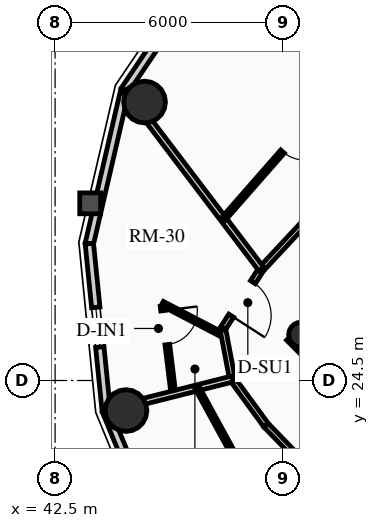
"""IFC4 building model, lengths in metres.
Left out: names, types, materials, properties, quantities, classifications, styles, units other than length and angle.
Written with IfcOpenShell. Run it as: python <this file> out.ifc"""

import sys

from ifc_helpers import new_model, si_unit, direction, frame, frame_2d, origin, origin_2d, place, context, subcontext, project, spatial, rectangle, circle, hollow_circle, extrude, source, transform, mapped, element, fill, save


model = new_model("IFC4")
c1 = context("Model", 3, precision=1e-05, world=origin(), true_north=direction((0.0, 1.0)))
c2 = subcontext(c1, "Body", "Model", "MODEL_VIEW")
j1 = project(units=[si_unit("LENGTHUNIT", "METRE"), si_unit("PLANEANGLEUNIT", "RADIAN")], contexts=[c1])
p1 = place(None, origin())
s1 = spatial("IfcSite", under=j1, at=p1, CompositionType="ELEMENT")
p2 = place(p1, origin())
s2 = spatial("IfcBuilding", under=s1, at=p2, CompositionType="ELEMENT")
p3 = place(p2, frame((0.0, 0.0, 217.03)))
s3 = spatial("IfcBuildingStorey", under=s2, at=p3, CompositionType="ELEMENT", Elevation=217.03)
p4 = place(p3, frame((58.702, 15.732, 0.0), z_axis=(0.0, 0.0, 1.0), x_axis=(-0.707106781187, 0.707106781187, 0.0)))
e1 = element("IfcWall", 1, at=p4, inside=s3, PredefinedType="SHEAR", context=c2, shape_type="SweptSolid", body=[
    extrude(rectangle(XDim=14.1, YDim=0.4, at=frame_2d((7.05, 0.0))), origin(), (0.0, 0.0, 1.0), 2.91),
])
p5 = place(p3, frame((48.873, 25.561, 0.0), z_axis=(0.0, 0.0, 1.0), x_axis=(0.707106781187, 0.707106781187, 0.0)))
e2 = element("IfcWall", 2, at=p5, inside=s3, PredefinedType="SHEAR", context=c2, shape_type="SweptSolid", body=[
    extrude(rectangle(XDim=10.7, YDim=0.4, at=frame_2d((5.35, 0.0))), origin(), (0.0, 0.0, 1.0), 2.91),
])
m1 = source(origin(), c2, "Body", "SweptSolid", [
    extrude(rectangle(XDim=1.5, YDim=2.02, at=frame_2d((0.75, 1.01))), frame((0.0, 0.21, 0.0), z_axis=(0.0, -1.0, 0.0), x_axis=(1.0, 0.0, 0.0)), (0.0, 0.0, 1.0), 0.42),
])
p6 = place(p5, frame((4.6, 0.0, 0.0)))
e3 = element("IfcOpeningElement", 3, at=p6, cuts=e2, PredefinedType="OPENING", context=c2, shape_type="MappedRepresentation", body=[
    mapped(m1, transform((0.0, 0.0, 0.0), x_axis=(1.0, 0.0, 0.0), y_axis=(0.0, 1.0, 0.0), z_axis=(0.0, 0.0, 1.0), scale=1.0)),
])
p7 = place(p3, frame((48.976, 25.706, 0.0), z_axis=(0.0, 0.0, 1.0), x_axis=(0.707106781187, 0.707106781187, 0.0)))
e4 = element("IfcColumn", 4, at=p7, inside=s3, PredefinedType="COLUMN", context=c2, shape_type="SweptSolid", body=[
    extrude(hollow_circle(Radius=0.33, WallThickness=0.025, at=origin_2d()), origin(), (0.0, 0.0, 1.0), 2.91),
])
for number, where, z_axis, x_axis in (
    (5, (44.854, 31.827, 0.0), (0.0, 0.0, 1.0), (1.0, 0.0, 0.0)),
    (6, (44.365, 23.709, 0.0), (0.0, 0.0, 1.0), (1.0, 0.0, 0.0)),
):
    element("IfcColumn", number, at=place(p3, frame(where, z_axis=z_axis, x_axis=x_axis)), inside=s3, PredefinedType="USERDEFINED", context=c2, shape_type="SweptSolid", body=[
        extrude(circle(Radius=0.55, at=origin_2d()), origin(), (0.0, 0.0, 1.0), 2.91),
    ])
p8 = place(p3, frame((44.337, 32.144, 0.0), z_axis=(0.0, 0.0, 1.0), x_axis=(0.559495003079, 0.828833723692, 0.0)))
e7 = element("IfcWall", 7, at=p8, inside=s3, PredefinedType="SOLIDWALL", context=c2, shape_type="SweptSolid", body=[
    extrude(rectangle(XDim=3.976, YDim=0.22, at=frame_2d((1.988, 0.0))), origin(), (0.0, 0.0, 1.0), 2.322),
])
m2 = source(origin(), c2, "Body", "SweptSolid", [
    extrude(rectangle(XDim=1.05, YDim=1.3, at=frame_2d((0.525, 0.65))), frame((0.0, 0.12, 0.0), z_axis=(0.0, -1.0, 0.0), x_axis=(1.0, 0.0, 0.0)), (0.0, 0.0, 1.0), 0.24),
])
p9 = place(p8, frame((1.463, 0.0, 0.65)))
e8 = element("IfcOpeningElement", 8, at=p9, cuts=e7, PredefinedType="OPENING", context=c2, shape_type="MappedRepresentation", body=[
    mapped(m2, transform((0.0, 0.0, 0.0), x_axis=(1.0, 0.0, 0.0), y_axis=(0.0, 1.0, 0.0), z_axis=(0.0, 0.0, 1.0), scale=1.0)),
])
p10 = place(p3, frame((43.401, 28.1, 0.0), z_axis=(0.0, 0.0, 1.0), x_axis=(0.225473813158, 0.974249228678, 0.0)))
e9 = element("IfcWall", 9, at=p10, inside=s3, PredefinedType="SOLIDWALL", context=c2, shape_type="SweptSolid", body=[
    extrude(rectangle(XDim=4.15, YDim=0.22, at=frame_2d((2.075, 0.0))), origin(), (0.0, 0.0, 1.0), 2.322),
])
p11 = place(p3, frame((43.845, 23.705, 0.0), z_axis=(0.0, 0.0, 1.0), x_axis=(-0.100570534541, 0.994929930991, 0.0)))
e10 = element("IfcWall", 10, at=p11, inside=s3, PredefinedType="SOLIDWALL", context=c2, shape_type="SweptSolid", body=[
    extrude(rectangle(XDim=4.418, YDim=0.22, at=frame_2d((2.209, 0.0))), origin(), (0.0, 0.0, 1.0), 2.322),
])
p12 = place(p11, frame((1.684, 0.0, 0.65)))
e11 = element("IfcOpeningElement", 11, at=p12, cuts=e10, PredefinedType="OPENING", context=c2, shape_type="MappedRepresentation", body=[
    mapped(m2, transform((0.0, 0.0, 0.0), x_axis=(1.0, 0.0, 0.0), y_axis=(0.0, 1.0, 0.0), z_axis=(0.0, 0.0, 1.0), scale=1.0)),
])
p13 = place(p3, frame((45.626, 19.387, 0.0), z_axis=(0.0, 0.0, 1.0), x_axis=(-0.381309704956, 0.924447353237, 0.0)))
e12 = element("IfcWall", 12, at=p13, inside=s3, PredefinedType="SOLIDWALL", context=c2, shape_type="SweptSolid", body=[
    extrude(rectangle(XDim=4.671, YDim=0.22, at=frame_2d((2.335, 0.0))), origin(), (0.0, 0.0, 1.0), 2.322),
])
p14 = place(p13, frame((1.81, 0.0, 0.65)))
e13 = element("IfcOpeningElement", 13, at=p14, cuts=e12, PredefinedType="OPENING", context=c2, shape_type="MappedRepresentation", body=[
    mapped(m2, transform((0.0, 0.0, 0.0), x_axis=(1.0, 0.0, 0.0), y_axis=(0.0, 1.0, 0.0), z_axis=(0.0, 0.0, 1.0), scale=1.0)),
])
p15 = place(p3, frame((52.212, 32.024, 0.0), z_axis=(0.0, 0.0, 1.0), x_axis=(-0.682158998173, -0.731203871169, 0.0)))
e14 = element("IfcWall", 14, at=p15, inside=s3, PredefinedType="PARTITIONING", context=c2, shape_type="SweptSolid", body=[
    extrude(rectangle(XDim=6.282, YDim=0.15, at=frame_2d((3.141, 0.0))), origin(), (0.0, 0.0, 1.0), 2.255),
])
p16 = place(p3, frame((47.927, 27.431, 0.0), z_axis=(0.0, 0.0, 1.0), x_axis=(-0.543126643356, -0.839650790077, 0.0)))
e15 = element("IfcWall", 15, at=p16, inside=s3, PredefinedType="PARTITIONING", context=c2, shape_type="SweptSolid", body=[
    extrude(rectangle(XDim=1.868, YDim=0.15, at=frame_2d((0.934, 0.0))), origin(), (0.0, 0.0, 1.0), 2.255),
])
m3 = source(origin(), c2, "Body", "SweptSolid", [
    extrude(rectangle(XDim=1.05, YDim=2.015, at=frame_2d((0.525, 1.007))), frame((0.0, 0.085, 0.0), z_axis=(0.0, -1.0, 0.0), x_axis=(1.0, 0.0, 0.0)), (0.0, 0.0, 1.0), 0.17),
])
p17 = place(p16, frame((0.409, 0.0, 0.0)))
e16 = element("IfcOpeningElement", 16, at=p17, cuts=e15, PredefinedType="OPENING", context=c2, shape_type="MappedRepresentation", body=[
    mapped(m3, transform((0.0, 0.0, 0.0), x_axis=(1.0, 0.0, 0.0), y_axis=(0.0, 1.0, 0.0), z_axis=(0.0, 0.0, 1.0), scale=1.0)),
])
p18 = place(p3, frame((46.912, 25.862, 0.0), z_axis=(0.0, 0.0, 1.0), x_axis=(0.186095172215, -0.98253172309, 0.0)))
e17 = element("IfcWall", 17, at=p18, inside=s3, PredefinedType="PARTITIONING", context=c2, shape_type="SweptSolid", body=[
    extrude(rectangle(XDim=1.346, YDim=0.15, at=frame_2d((0.673, 0.0))), origin(), (0.0, 0.0, 1.0), 2.322),
])
p19 = place(p3, frame((47.163, 24.54, 0.0), z_axis=(0.0, 0.0, 1.0), x_axis=(0.589711902124, -0.807613690135, 0.0)))
e18 = element("IfcWall", 18, at=p19, inside=s3, PredefinedType="PARTITIONING", context=c2, shape_type="SweptSolid", body=[
    extrude(rectangle(XDim=1.507, YDim=0.15, at=frame_2d((0.753, 0.0))), origin(), (0.0, 0.0, 1.0), 2.255),
])
p20 = place(p3, frame((48.052, 23.323, 0.0), z_axis=(0.0, 0.0, 1.0), x_axis=(0.696573981306, -0.717484974454, 0.0)))
e19 = element("IfcWall", 19, at=p20, inside=s3, PredefinedType="PARTITIONING", context=c2, shape_type="SweptSolid", body=[
    extrude(rectangle(XDim=5.849, YDim=0.15, at=frame_2d((2.925, 0.0))), origin(), (0.0, 0.0, 1.0), 2.685),
])
p21 = place(p3, frame((47.927, 27.431, 0.0), z_axis=(0.0, 0.0, 1.0), x_axis=(-0.604823333103, 0.796359677366, 0.0)))
e20 = element("IfcWall", 20, at=p21, inside=s3, PredefinedType="PARTITIONING", context=c2, shape_type="SweptSolid", body=[
    extrude(rectangle(XDim=5.907, YDim=0.16, at=frame_2d((2.953, 0.0))), origin(), (0.0, 0.0, 1.0), 2.322),
])
p22 = place(p3, frame((47.163, 24.54, 0.0), z_axis=(0.0, 0.0, 1.0), x_axis=(-0.9696166611, -0.244629373781, 0.0)))
e21 = element("IfcWall", 21, at=p22, inside=s3, PredefinedType="PARTITIONING", context=c2, shape_type="SweptSolid", body=[
    extrude(rectangle(XDim=3.401, YDim=0.16, at=frame_2d((1.701, 0.0))), origin(), (0.0, 0.0, 1.0), 2.322),
])
p23 = place(p3, frame((50.634, 32.977, 0.0), z_axis=(0.0, 0.0, 1.0), x_axis=(-0.659241945747, -0.751930885765, 0.0)))
e22 = element("IfcWall", 22, at=p23, inside=s3, PredefinedType="PARTITIONING", context=c2, shape_type="SweptSolid", body=[
    extrude(rectangle(XDim=5.624, YDim=0.125, at=frame_2d((2.812, 0.0))), origin(), (0.0, 0.0, 1.0), 2.255),
])
m4 = source(origin(), c2, "Body", "SweptSolid", [
    extrude(rectangle(XDim=0.9, YDim=2.005, at=frame_2d((0.45, 1.002))), frame((0.0, 0.073, 0.0), z_axis=(0.0, -1.0, 0.0), x_axis=(1.0, 0.0, 0.0)), (0.0, 0.0, 1.0), 0.145),
])
p24 = place(p23, frame((2.362, 0.0, 0.0)))
e23 = element("IfcOpeningElement", 23, at=p24, cuts=e22, PredefinedType="OPENING", context=c2, shape_type="MappedRepresentation", body=[
    mapped(m4, transform((0.0, 0.0, 0.0), x_axis=(1.0, 0.0, 0.0), y_axis=(0.0, 1.0, 0.0), z_axis=(0.0, 0.0, 1.0), scale=1.0)),
])
p25 = place(p3, frame((46.844, 25.731, 0.0), z_axis=(0.0, 0.0, 1.0), x_axis=(-0.886802533251, 0.462148533504, 0.0)))
e24 = element("IfcWall", 24, at=p25, inside=s3, PredefinedType="PARTITIONING", context=c2, shape_type="SweptSolid", body=[
    extrude(rectangle(XDim=1.719, YDim=0.125, at=frame_2d((0.859, 0.0))), origin(), (0.0, 0.0, 1.0), 2.685),
])
p26 = place(p3, frame((45.328, 26.457, 0.0), z_axis=(0.0, 0.0, 1.0), x_axis=(0.122605181354, -0.992455525203, 0.0)))
e25 = element("IfcWall", 25, at=p26, inside=s3, PredefinedType="PARTITIONING", context=c2, shape_type="SweptSolid", body=[
    extrude(rectangle(XDim=2.228, YDim=0.125, at=frame_2d((1.114, 0.0))), origin(), (0.0, 0.0, 1.0), 2.322),
])
p27 = place(p26, frame((0.12, 0.0, 0.0)))
e26 = element("IfcOpeningElement", 26, at=p27, cuts=e25, PredefinedType="OPENING", context=c2, shape_type="MappedRepresentation", body=[
    mapped(m4, transform((0.0, 0.0, 0.0), x_axis=(1.0, 0.0, 0.0), y_axis=(0.0, 1.0, 0.0), z_axis=(0.0, 0.0, 1.0), scale=1.0)),
])
p28 = place(p3, frame((46.24, 24.307, 0.0), z_axis=(0.0, 0.0, 1.0), x_axis=(0.479212341296, -0.87769899849, 0.0)))
e27 = element("IfcWall", 27, at=p28, inside=s3, PredefinedType="PARTITIONING", context=c2, shape_type="SweptSolid", body=[
    extrude(rectangle(XDim=2.374, YDim=0.125, at=frame_2d((1.187, 0.0))), origin(), (0.0, 0.0, 1.0), 2.255),
])
m5 = source(origin(), c2, "Body", "SweptSolid", [
    extrude(rectangle(XDim=1.05, YDim=1.3, at=frame_2d((0.525, 0.65))), frame((0.0, 0.03, 0.0), z_axis=(0.0, -1.0, 0.0), x_axis=(1.0, 0.0, 0.0)), (0.0, 0.0, 1.0), 0.06),
])
p29 = place(p12, origin())
e28 = element("IfcWindow", 28, at=p29, inside=s3, PartitioningType="SINGLE_PANEL", PredefinedType="WINDOW", context=c2, shape_type="MappedRepresentation", body=[
    mapped(m5, transform((0.0, 0.0, 0.0), x_axis=(1.0, 0.0, 0.0), y_axis=(0.0, 1.0, 0.0), z_axis=(0.0, 0.0, 1.0), scale=1.0)),
])
fill(e11, e28)
m6 = source(origin(), c2, "Body", "SweptSolid", [
    extrude(rectangle(XDim=0.9, YDim=2.005, at=frame_2d((0.45, 1.002))), frame((0.0, 0.025, 0.0), z_axis=(0.0, -1.0, 0.0), x_axis=(1.0, 0.0, 0.0)), (0.0, 0.0, 1.0), 0.05),
])
p30 = place(p24, origin())
e29 = element("IfcDoor", 29, at=p30, inside=s3, OperationType="SINGLE_SWING_LEFT", PredefinedType="DOOR", context=c2, shape_type="MappedRepresentation", body=[
    mapped(m6, transform((0.0, 0.0, 0.0), x_axis=(1.0, 0.0, 0.0), y_axis=(0.0, 1.0, 0.0), z_axis=(0.0, 0.0, 1.0), scale=1.0)),
])
fill(e23, e29)
m7 = source(origin(), c2, "Body", "SweptSolid", [
    extrude(rectangle(XDim=1.05, YDim=2.015, at=frame_2d((0.525, 1.007))), frame((0.0, 0.025, 0.0), z_axis=(0.0, -1.0, 0.0), x_axis=(1.0, 0.0, 0.0)), (0.0, 0.0, 1.0), 0.05),
])
p31 = place(p17, origin())
e30 = element("IfcDoor", 30, at=p31, inside=s3, OperationType="SINGLE_SWING_RIGHT", PredefinedType="DOOR", context=c2, shape_type="MappedRepresentation", body=[
    mapped(m7, transform((0.0, 0.0, 0.0), x_axis=(1.0, 0.0, 0.0), y_axis=(0.0, 1.0, 0.0), z_axis=(0.0, 0.0, 1.0), scale=1.0)),
])
fill(e16, e30)
p32 = place(p27, origin())
e31 = element("IfcDoor", 31, at=p32, inside=s3, OperationType="SINGLE_SWING_LEFT", PredefinedType="DOOR", context=c2, shape_type="MappedRepresentation", body=[
    mapped(m6, transform((0.0, 0.0, 0.0), x_axis=(1.0, 0.0, 0.0), y_axis=(0.0, 1.0, 0.0), z_axis=(0.0, 0.0, 1.0), scale=1.0)),
])
fill(e26, e31)
save(model, sys.argv[1])
